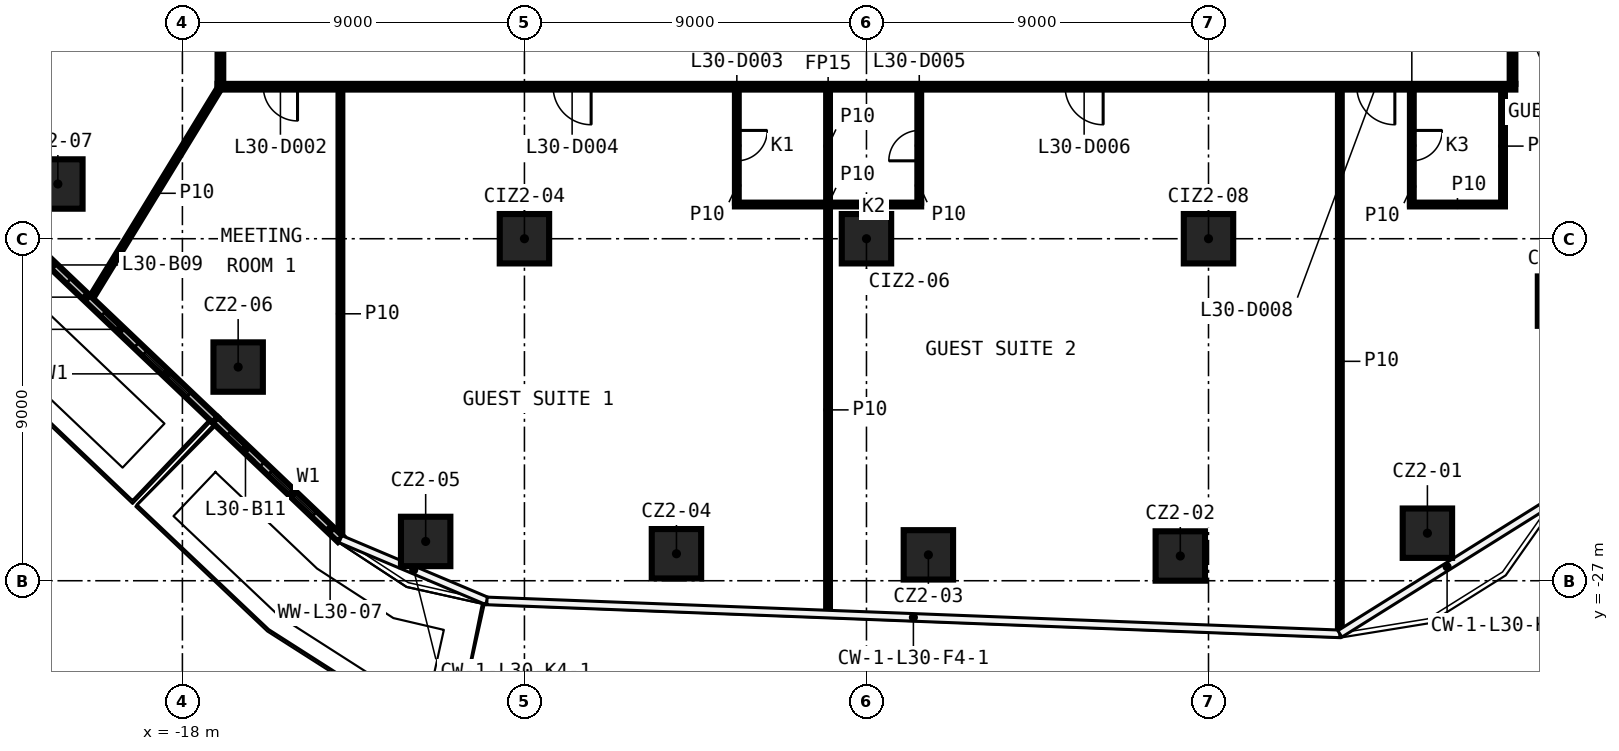
"""IFC4 building model, lengths in metres.
Left out: names, types, materials, properties, quantities, classifications, styles, units other than length and angle.
Written with IfcOpenShell. Run it as: python <this file> out.ifc"""

import sys

from ifc_helpers import new_model, si_unit, direction, frame, frame_2d, origin, origin_2d, place, context, subcontext, project, spatial, rectangle, extrude, element, fill, save


model = new_model("IFC4")
c1 = context("Model", 3, precision=1e-05, world=origin(), true_north=direction((0.0, 1.0)))
c2 = subcontext(c1, "Body", "Model", "MODEL_VIEW")
j1 = project(units=[si_unit("LENGTHUNIT", "METRE"), si_unit("PLANEANGLEUNIT", "RADIAN")], contexts=[c1])
p1 = place(None, origin())
s1 = spatial("IfcSite", under=j1, at=p1, CompositionType="ELEMENT")
p2 = place(p1, origin())
s2 = spatial("IfcBuilding", under=s1, at=p2, CompositionType="ELEMENT")
p3 = place(p2, frame((0.0, 0.0, 135.9)))
s3 = spatial("IfcBuildingStorey", under=s2, at=p3, CompositionType="ELEMENT", Elevation=135.9)
for number, where, z_axis, x_axis in (
    (1, (14.76, -25.749, 0.0), (0.0, 0.0, 1.0), (1.0, 0.0, 0.0)),
    (2, (8.258, -26.349, 0.0), (0.0, 0.0, 1.0), (1.0, 0.0, 0.0)),
    (3, (1.629, -26.319, 0.0), (0.0, 0.0, 1.0), (1.0, 0.0, 0.0)),
    (4, (-5.0, -26.29, 0.0), (0.0, 0.0, 1.0), (1.0, 0.0, 0.0)),
    (5, (-11.599, -25.966, 0.0), (0.0, 0.0, 1.0), (1.0, 0.0, 0.0)),
    (6, (-16.533, -21.377, 0.0), (0.0, 0.0, 1.0), (1.0, 0.0, 0.0)),
    (7, (-21.277, -16.56, 0.0), (0.0, 0.0, 1.0), (1.0, 0.0, 0.0)),
    (8, (18.315, -19.642, 0.0), (0.0, 0.0, 1.0), (1.0, 0.0, 0.0)),
    (9, (-9.0, -18.0, 0.0), (0.0, 0.0, 1.0), (1.0, 0.0, 0.0)),
    (10, (0.0, -18.0, 0.0), (0.0, 0.0, 1.0), (1.0, 0.0, 0.0)),
    (11, (9.0, -18.0, 0.0), (0.0, 0.0, 1.0), (1.0, 0.0, 0.0)),
):
    element("IfcColumn", number, at=place(p3, frame(where, z_axis=z_axis, x_axis=x_axis)), inside=s3, PredefinedType="COLUMN", context=c2, shape_type="SweptSolid", body=[
        extrude(rectangle(XDim=1.3, YDim=1.3, at=origin_2d()), origin(), (0.0, 0.0, 1.0), 3.3),
    ])
p4 = place(p3, frame((-3.461, -17.1, 0.0), z_axis=(0.0, 0.0, 1.0), x_axis=(1.0, 0.0, 0.0)))
e12 = element("IfcWall", 12, at=p4, inside=s3, PredefinedType="PARTITIONING", context=c2, shape_type="SweptSolid", body=[
    extrude(rectangle(XDim=4.9, YDim=0.1, at=frame_2d((2.45, 0.0))), origin(), (0.0, 0.0, 1.0), 3.3),
])
p5 = place(p3, frame((14.3, -17.1, 0.0), z_axis=(0.0, 0.0, 1.0), x_axis=(1.0, 0.0, 0.0)))
e13 = element("IfcWall", 13, at=p5, inside=s3, PredefinedType="PARTITIONING", context=c2, shape_type="SweptSolid", body=[
    extrude(rectangle(XDim=2.5, YDim=0.1, at=frame_2d((1.25, 0.0))), origin(), (0.0, 0.0, 1.0), 3.3),
])
p6 = place(p3, frame((17.075, -14.0, 0.0), z_axis=(0.0, 0.0, 1.0), x_axis=(-1.0, 0.0, 0.0)))
e14 = element("IfcWall", 14, at=p6, inside=s3, PredefinedType="PARTITIONING", context=c2, shape_type="SweptSolid", body=[
    extrude(rectangle(XDim=34.15, YDim=0.15, at=frame_2d((17.075, 0.0))), origin(), (0.0, 0.0, 1.0), 3.3),
])
p7 = place(p6, frame((32.046, 0.0, 0.0)))
e15 = element("IfcOpeningElement", 15, at=p7, cuts=e14, PredefinedType="OPENING", context=c2, shape_type="SweptSolid", body=[
    extrude(rectangle(XDim=0.9, YDim=2.1, at=frame_2d((0.45, 1.05))), frame((0.0, 0.085, 0.0), z_axis=(0.0, -1.0, 0.0), x_axis=(1.0, 0.0, 0.0)), (0.0, 0.0, 1.0), 0.17),
])
p8 = place(p6, frame((24.32, 0.0, 0.0)))
e16 = element("IfcOpeningElement", 16, at=p8, cuts=e14, PredefinedType="OPENING", context=c2, shape_type="SweptSolid", body=[
    extrude(rectangle(XDim=1.0, YDim=2.1, at=frame_2d((0.5, 1.05))), frame((0.0, 0.085, 0.0), z_axis=(0.0, -1.0, 0.0), x_axis=(1.0, 0.0, 0.0)), (0.0, 0.0, 1.0), 0.17),
])
p9 = place(p6, frame((10.847, 0.0, 0.0)))
e17 = element("IfcOpeningElement", 17, at=p9, cuts=e14, PredefinedType="OPENING", context=c2, shape_type="SweptSolid", body=[
    extrude(rectangle(XDim=1.0, YDim=2.1, at=frame_2d((0.5, 1.05))), frame((0.0, 0.085, 0.0), z_axis=(0.0, -1.0, 0.0), x_axis=(1.0, 0.0, 0.0)), (0.0, 0.0, 1.0), 0.17),
])
p10 = place(p6, frame((3.172, 0.0, 0.0)))
e18 = element("IfcOpeningElement", 18, at=p10, cuts=e14, PredefinedType="OPENING", context=c2, shape_type="SweptSolid", body=[
    extrude(rectangle(XDim=1.0, YDim=2.1, at=frame_2d((0.5, 1.05))), frame((0.0, 0.085, 0.0), z_axis=(0.0, -1.0, 0.0), x_axis=(1.0, 0.0, 0.0)), (0.0, 0.0, 1.0), 0.17),
])
p11 = place(p3, frame((-20.429, -19.608, 0.0), z_axis=(0.0, 0.0, 1.0), x_axis=(0.521610739124, 0.853183589171, 0.0)))
e19 = element("IfcWall", 19, at=p11, inside=s3, PredefinedType="PARTITIONING", context=c2, shape_type="SweptSolid", body=[
    extrude(rectangle(XDim=6.574, YDim=0.1, at=frame_2d((3.287, 0.0))), origin(), (0.0, 0.0, 1.0), 3.3),
])
p12 = place(p3, frame((17.0, 13.925, 0.0), z_axis=(0.0, 0.0, 1.0), x_axis=(0.0, -1.0, 0.0)))
e20 = element("IfcWall", 20, at=p12, inside=s3, PredefinedType="PARTITIONING", context=c2, shape_type="SweptSolid", body=[
    extrude(rectangle(XDim=27.85, YDim=0.15, at=frame_2d((13.925, 0.0))), origin(), (0.0, 0.0, 1.0), 3.3),
])
p13 = place(p12, frame((24.983, 0.0, 0.0)))
e21 = element("IfcOpeningElement", 21, at=p13, cuts=e20, PredefinedType="OPENING", context=c2, shape_type="SweptSolid", body=[
    extrude(rectangle(XDim=0.9, YDim=2.1, at=frame_2d((0.45, 1.05))), frame((0.0, 0.085, 0.0), z_axis=(0.0, -1.0, 0.0), x_axis=(1.0, 0.0, 0.0)), (0.0, 0.0, 1.0), 0.17),
])
p14 = place(p12, frame((20.143, 0.0, 0.0)))
e22 = element("IfcOpeningElement", 22, at=p14, cuts=e20, PredefinedType="OPENING", context=c2, shape_type="SweptSolid", body=[
    extrude(rectangle(XDim=0.9, YDim=2.1, at=frame_2d((0.45, 1.05))), frame((0.0, 0.085, 0.0), z_axis=(0.0, -1.0, 0.0), x_axis=(1.0, 0.0, 0.0)), (0.0, 0.0, 1.0), 0.17),
])
p15 = place(p12, frame((11.054, 0.0, 0.0)))
e23 = element("IfcOpeningElement", 23, at=p15, cuts=e20, PredefinedType="OPENING", context=c2, shape_type="SweptSolid", body=[
    extrude(rectangle(XDim=1.0, YDim=2.1, at=frame_2d((0.5, 1.05))), frame((0.0, 0.085, 0.0), z_axis=(0.0, -1.0, 0.0), x_axis=(1.0, 0.0, 0.0)), (0.0, 0.0, 1.0), 0.17),
])
p16 = place(p12, frame((7.139, 0.0, 0.0)))
e24 = element("IfcOpeningElement", 24, at=p16, cuts=e20, PredefinedType="OPENING", context=c2, shape_type="SweptSolid", body=[
    extrude(rectangle(XDim=0.9, YDim=2.1, at=frame_2d((0.45, 1.05))), frame((0.0, 0.085, 0.0), z_axis=(0.0, -1.0, 0.0), x_axis=(1.0, 0.0, 0.0)), (0.0, 0.0, 1.0), 0.17),
])
p17 = place(p3, frame((16.75, -17.05, 0.0), z_axis=(0.0, 0.0, 1.0), x_axis=(0.0, 1.0, 0.0)))
e25 = element("IfcWall", 25, at=p17, inside=s3, PredefinedType="PARTITIONING", context=c2, shape_type="SweptSolid", body=[
    extrude(rectangle(XDim=2.975, YDim=0.1, at=frame_2d((1.488, 0.0))), origin(), (0.0, 0.0, 1.0), 3.3),
])
p18 = place(p3, frame((14.35, -14.075, 0.0), z_axis=(0.0, 0.0, 1.0), x_axis=(0.0, -1.0, 0.0)))
e26 = element("IfcWall", 26, at=p18, inside=s3, PredefinedType="PARTITIONING", context=c2, shape_type="SweptSolid", body=[
    extrude(rectangle(XDim=3.025, YDim=0.1, at=frame_2d((1.513, 0.0))), origin(), (0.0, 0.0, 1.0), 3.3),
])
p19 = place(p18, frame((1.075, 0.0, 0.0)))
e27 = element("IfcOpeningElement", 27, at=p19, cuts=e26, PredefinedType="OPENING", context=c2, shape_type="SweptSolid", body=[
    extrude(rectangle(XDim=0.8, YDim=2.1, at=frame_2d((0.4, 1.05))), frame((0.0, 0.06, 0.0), z_axis=(0.0, -1.0, 0.0), x_axis=(1.0, 0.0, 0.0)), (0.0, 0.0, 1.0), 0.12),
])
p20 = place(p3, frame((12.456, -28.378, 0.0), z_axis=(0.0, 0.0, 1.0), x_axis=(0.0, 1.0, 0.0)))
e28 = element("IfcWall", 28, at=p20, inside=s3, PredefinedType="PARTITIONING", context=c2, shape_type="SweptSolid", body=[
    extrude(rectangle(XDim=14.303, YDim=0.1, at=frame_2d((7.151, 0.0))), origin(), (0.0, 0.0, 1.0), 3.3),
])
p21 = place(p3, frame((1.389, -17.05, 0.0), z_axis=(0.0, 0.0, 1.0), x_axis=(0.0, 1.0, 0.0)))
e29 = element("IfcWall", 29, at=p21, inside=s3, PredefinedType="PARTITIONING", context=c2, shape_type="SweptSolid", body=[
    extrude(rectangle(XDim=2.975, YDim=0.1, at=frame_2d((1.488, 0.0))), origin(), (0.0, 0.0, 1.0), 3.3),
])
p22 = place(p21, frame((1.1, 0.0, 0.0)))
e30 = element("IfcOpeningElement", 30, at=p22, cuts=e29, PredefinedType="OPENING", context=c2, shape_type="SweptSolid", body=[
    extrude(rectangle(XDim=0.8, YDim=2.1, at=frame_2d((0.4, 1.05))), frame((0.0, 0.06, 0.0), z_axis=(0.0, -1.0, 0.0), x_axis=(1.0, 0.0, 0.0)), (0.0, 0.0, 1.0), 0.12),
])
p23 = place(p3, frame((-1.011, -27.858, 0.0), z_axis=(0.0, 0.0, 1.0), x_axis=(0.0, 1.0, 0.0)))
e31 = element("IfcWall", 31, at=p23, inside=s3, PredefinedType="PARTITIONING", context=c2, shape_type="SweptSolid", body=[
    extrude(rectangle(XDim=10.708, YDim=0.1, at=frame_2d((5.354, 0.0))), origin(), (0.0, 0.0, 1.0), 3.3),
])
p24 = place(p3, frame((-1.011, -17.05, 0.0), z_axis=(0.0, 0.0, 1.0), x_axis=(0.0, 1.0, 0.0)))
e32 = element("IfcWall", 32, at=p24, inside=s3, PredefinedType="PARTITIONING", context=c2, shape_type="SweptSolid", body=[
    extrude(rectangle(XDim=2.975, YDim=0.1, at=frame_2d((1.488, 0.0))), origin(), (0.0, 0.0, 1.0), 3.3),
])
p25 = place(p3, frame((-3.411, -14.075, 0.0), z_axis=(0.0, 0.0, 1.0), x_axis=(0.0, -1.0, 0.0)))
e33 = element("IfcWall", 33, at=p25, inside=s3, PredefinedType="PARTITIONING", context=c2, shape_type="SweptSolid", body=[
    extrude(rectangle(XDim=2.975, YDim=0.1, at=frame_2d((1.488, 0.0))), origin(), (0.0, 0.0, 1.0), 3.3),
])
p26 = place(p25, frame((1.075, 0.0, 0.0)))
e34 = element("IfcOpeningElement", 34, at=p26, cuts=e33, PredefinedType="OPENING", context=c2, shape_type="SweptSolid", body=[
    extrude(rectangle(XDim=0.8, YDim=2.1, at=frame_2d((0.4, 1.05))), frame((0.0, 0.06, 0.0), z_axis=(0.0, -1.0, 0.0), x_axis=(1.0, 0.0, 0.0)), (0.0, 0.0, 1.0), 0.12),
])
p27 = place(p3, frame((-13.842, -25.876, 0.0), z_axis=(0.0, 0.0, 1.0), x_axis=(0.0, 1.0, 0.0)))
e35 = element("IfcWall", 35, at=p27, inside=s3, PredefinedType="PARTITIONING", context=c2, shape_type="SweptSolid", body=[
    extrude(rectangle(XDim=11.801, YDim=0.1, at=frame_2d((5.9, 0.0))), origin(), (0.0, 0.0, 1.0), 3.3),
])
p28 = place(p3, frame((-17.0, -13.925, 0.0), z_axis=(0.0, 0.0, 1.0), x_axis=(0.0, 1.0, 0.0)))
e36 = element("IfcWall", 36, at=p28, inside=s3, PredefinedType="PARTITIONING", context=c2, shape_type="SweptSolid", body=[
    extrude(rectangle(XDim=27.85, YDim=0.15, at=frame_2d((13.925, 0.0))), origin(), (0.0, 0.0, 1.0), 3.3),
])
p29 = place(p28, frame((11.107, 0.0, 0.0)))
e37 = element("IfcOpeningElement", 37, at=p29, cuts=e36, PredefinedType="OPENING", context=c2, shape_type="SweptSolid", body=[
    extrude(rectangle(XDim=0.9, YDim=2.1, at=frame_2d((0.45, 1.05))), frame((0.0, 0.085, 0.0), z_axis=(0.0, -1.0, 0.0), x_axis=(1.0, 0.0, 0.0)), (0.0, 0.0, 1.0), 0.17),
])
p30 = place(p28, frame((25.204, 0.0, 0.0)))
e38 = element("IfcOpeningElement", 38, at=p30, cuts=e36, PredefinedType="OPENING", context=c2, shape_type="SweptSolid", body=[
    extrude(rectangle(XDim=0.9, YDim=2.1, at=frame_2d((0.45, 1.05))), frame((0.0, 0.085, 0.0), z_axis=(0.0, -1.0, 0.0), x_axis=(1.0, 0.0, 0.0)), (0.0, 0.0, 1.0), 0.17),
])
p31 = place(p28, frame((18.833, 0.0, 0.0)))
e39 = element("IfcOpeningElement", 39, at=p31, cuts=e36, PredefinedType="OPENING", context=c2, shape_type="SweptSolid", body=[
    extrude(rectangle(XDim=1.0, YDim=2.1, at=frame_2d((0.5, 1.05))), frame((0.0, 0.085, 0.0), z_axis=(0.0, -1.0, 0.0), x_axis=(1.0, 0.0, 0.0)), (0.0, 0.0, 1.0), 0.17),
])
p32 = place(p28, frame((17.31, 0.0, 0.0)))
e40 = element("IfcOpeningElement", 40, at=p32, cuts=e36, PredefinedType="OPENING", context=c2, shape_type="SweptSolid", body=[
    extrude(rectangle(XDim=1.0, YDim=2.1, at=frame_2d((0.5, 1.05))), frame((0.0, 0.085, 0.0), z_axis=(0.0, -1.0, 0.0), x_axis=(1.0, 0.0, 0.0)), (0.0, 0.0, 1.0), 0.17),
])
p33 = place(p3, frame((-23.741, -16.484, 0.0), z_axis=(0.0, 0.0, 1.0), x_axis=(0.724483683082, -0.689291950445, 0.0)))
e41 = element("IfcWall", 41, at=p33, inside=s3, PredefinedType="SOLIDWALL", context=c2, shape_type="SweptSolid", body=[
    extrude(rectangle(XDim=9.116, YDim=0.2, at=frame_2d((4.558, 0.0))), origin(), (0.0, 0.0, 1.0), 3.3),
])
p34 = place(p33, frame((0.5, 0.0, 0.6)))
e42 = element("IfcOpeningElement", 42, at=p34, cuts=e41, PredefinedType="OPENING", context=c2, shape_type="SweptSolid", body=[
    extrude(rectangle(XDim=1.6, YDim=2.4, at=frame_2d((0.8, 1.2))), frame((0.0, 0.11, 0.0), z_axis=(0.0, -1.0, 0.0), x_axis=(1.0, 0.0, 0.0)), (0.0, 0.0, 1.0), 0.22),
])
p35 = place(p33, frame((2.6, 0.0, 0.0)))
e43 = element("IfcOpeningElement", 43, at=p35, cuts=e41, PredefinedType="OPENING", context=c2, shape_type="SweptSolid", body=[
    extrude(rectangle(XDim=1.2, YDim=2.4, at=frame_2d((0.6, 1.2))), frame((0.0, 0.11, 0.0), z_axis=(0.0, -1.0, 0.0), x_axis=(1.0, 0.0, 0.0)), (0.0, 0.0, 1.0), 0.22),
])
p36 = place(p33, frame((6.558, 0.0, 0.6)))
e44 = element("IfcOpeningElement", 44, at=p36, cuts=e41, PredefinedType="OPENING", context=c2, shape_type="SweptSolid", body=[
    extrude(rectangle(XDim=1.6, YDim=2.4, at=frame_2d((0.8, 1.2))), frame((0.0, 0.11, 0.0), z_axis=(0.0, -1.0, 0.0), x_axis=(1.0, 0.0, 0.0)), (0.0, 0.0, 1.0), 0.22),
])
p37 = place(p33, frame((5.058, 0.0, 0.0)))
e45 = element("IfcOpeningElement", 45, at=p37, cuts=e41, PredefinedType="OPENING", context=c2, shape_type="SweptSolid", body=[
    extrude(rectangle(XDim=1.2, YDim=2.4, at=frame_2d((0.6, 1.2))), frame((0.0, 0.11, 0.0), z_axis=(0.0, -1.0, 0.0), x_axis=(1.0, 0.0, 0.0)), (0.0, 0.0, 1.0), 0.22),
])
p38 = place(p3, frame((-17.137, -22.768, 0.0), z_axis=(0.0, 0.0, 1.0), x_axis=(0.724465880686, -0.689310661257, 0.0)))
e46 = element("IfcWall", 46, at=p38, inside=s3, PredefinedType="SOLIDWALL", context=c2, shape_type="SweptSolid", body=[
    extrude(rectangle(XDim=4.549, YDim=0.2, at=frame_2d((2.274, 0.0))), origin(), (0.0, 0.0, 1.0), 3.3),
])
p39 = place(p38, frame((2.0, 0.0, 0.6)))
e47 = element("IfcOpeningElement", 47, at=p39, cuts=e46, PredefinedType="OPENING", context=c2, shape_type="SweptSolid", body=[
    extrude(rectangle(XDim=1.6, YDim=2.4, at=frame_2d((0.8, 1.2))), frame((0.0, 0.11, 0.0), z_axis=(0.0, -1.0, 0.0), x_axis=(1.0, 0.0, 0.0)), (0.0, 0.0, 1.0), 0.22),
])
p40 = place(p38, frame((0.5, 0.0, 0.0)))
e48 = element("IfcOpeningElement", 48, at=p40, cuts=e46, PredefinedType="OPENING", context=c2, shape_type="SweptSolid", body=[
    extrude(rectangle(XDim=1.2, YDim=2.4, at=frame_2d((0.6, 1.2))), frame((0.0, 0.11, 0.0), z_axis=(0.0, -1.0, 0.0), x_axis=(1.0, 0.0, 0.0)), (0.0, 0.0, 1.0), 0.22),
])
p41 = place(p7, origin())
e49 = element("IfcDoor", 49, at=p41, inside=s3, OperationType="SINGLE_SWING_RIGHT", PredefinedType="DOOR", context=c2, shape_type="SweptSolid", body=[
    extrude(rectangle(XDim=0.9, YDim=2.1, at=frame_2d((0.45, 1.05))), frame((0.0, 0.025, 0.0), z_axis=(0.0, -1.0, 0.0), x_axis=(1.0, 0.0, 0.0)), (0.0, 0.0, 1.0), 0.05),
])
fill(e15, e49)
p42 = place(p26, origin())
e50 = element("IfcDoor", 50, at=p42, inside=s3, OperationType="SINGLE_SWING_RIGHT", PredefinedType="DOOR", context=c2, shape_type="SweptSolid", body=[
    extrude(rectangle(XDim=0.8, YDim=2.1, at=frame_2d((0.4, 1.05))), frame((0.0, 0.025, 0.0), z_axis=(0.0, -1.0, 0.0), x_axis=(1.0, 0.0, 0.0)), (0.0, 0.0, 1.0), 0.05),
])
fill(e34, e50)
p43 = place(p8, origin())
e51 = element("IfcDoor", 51, at=p43, inside=s3, OperationType="SINGLE_SWING_LEFT", PredefinedType="DOOR", context=c2, shape_type="SweptSolid", body=[
    extrude(rectangle(XDim=1.0, YDim=2.1, at=frame_2d((0.5, 1.05))), frame((0.0, 0.025, 0.0), z_axis=(0.0, -1.0, 0.0), x_axis=(1.0, 0.0, 0.0)), (0.0, 0.0, 1.0), 0.05),
])
fill(e16, e51)
p44 = place(p22, origin())
e52 = element("IfcDoor", 52, at=p44, inside=s3, OperationType="SINGLE_SWING_LEFT", PredefinedType="DOOR", context=c2, shape_type="SweptSolid", body=[
    extrude(rectangle(XDim=0.8, YDim=2.1, at=frame_2d((0.4, 1.05))), frame((0.0, 0.025, 0.0), z_axis=(0.0, -1.0, 0.0), x_axis=(1.0, 0.0, 0.0)), (0.0, 0.0, 1.0), 0.05),
])
fill(e30, e52)
p45 = place(p9, origin())
e53 = element("IfcDoor", 53, at=p45, inside=s3, OperationType="SINGLE_SWING_RIGHT", PredefinedType="DOOR", context=c2, shape_type="SweptSolid", body=[
    extrude(rectangle(XDim=1.0, YDim=2.1, at=frame_2d((0.5, 1.05))), frame((0.0, 0.025, 0.0), z_axis=(0.0, -1.0, 0.0), x_axis=(1.0, 0.0, 0.0)), (0.0, 0.0, 1.0), 0.05),
])
fill(e17, e53)
p46 = place(p19, origin())
e54 = element("IfcDoor", 54, at=p46, inside=s3, OperationType="SINGLE_SWING_RIGHT", PredefinedType="DOOR", context=c2, shape_type="SweptSolid", body=[
    extrude(rectangle(XDim=0.8, YDim=2.1, at=frame_2d((0.4, 1.05))), frame((0.0, 0.025, 0.0), z_axis=(0.0, -1.0, 0.0), x_axis=(1.0, 0.0, 0.0)), (0.0, 0.0, 1.0), 0.05),
])
fill(e27, e54)
p47 = place(p10, origin())
e55 = element("IfcDoor", 55, at=p47, inside=s3, OperationType="SINGLE_SWING_LEFT", PredefinedType="DOOR", context=c2, shape_type="SweptSolid", body=[
    extrude(rectangle(XDim=1.0, YDim=2.1, at=frame_2d((0.5, 1.05))), frame((0.0, 0.025, 0.0), z_axis=(0.0, -1.0, 0.0), x_axis=(1.0, 0.0, 0.0)), (0.0, 0.0, 1.0), 0.05),
])
fill(e18, e55)
p48 = place(p35, origin())
e56 = element("IfcDoor", 56, at=p48, inside=s3, OperationType="SLIDING_TO_LEFT", PredefinedType="DOOR", context=c2, shape_type="SweptSolid", body=[
    extrude(rectangle(XDim=1.2, YDim=2.4, at=frame_2d((0.6, 1.2))), frame((0.0, 0.025, 0.0), z_axis=(0.0, -1.0, 0.0), x_axis=(1.0, 0.0, 0.0)), (0.0, 0.0, 1.0), 0.05),
])
fill(e43, e56)
p49 = place(p36, origin())
e57 = element("IfcWindow", 57, at=p49, inside=s3, PartitioningType="SINGLE_PANEL", PredefinedType="WINDOW", context=c2, shape_type="SweptSolid", body=[
    extrude(rectangle(XDim=1.6, YDim=2.4, at=frame_2d((0.8, 1.2))), frame((0.0, 0.03, 0.0), z_axis=(0.0, -1.0, 0.0), x_axis=(1.0, 0.0, 0.0)), (0.0, 0.0, 1.0), 0.06),
])
fill(e44, e57)
p50 = place(p37, origin())
e58 = element("IfcDoor", 58, at=p50, inside=s3, OperationType="SLIDING_TO_LEFT", PredefinedType="DOOR", context=c2, shape_type="SweptSolid", body=[
    extrude(rectangle(XDim=1.2, YDim=2.4, at=frame_2d((0.6, 1.2))), frame((0.0, 0.025, 0.0), z_axis=(0.0, -1.0, 0.0), x_axis=(1.0, 0.0, 0.0)), (0.0, 0.0, 1.0), 0.05),
])
fill(e45, e58)
p51 = place(p39, origin())
e59 = element("IfcWindow", 59, at=p51, inside=s3, PartitioningType="SINGLE_PANEL", PredefinedType="WINDOW", context=c2, shape_type="SweptSolid", body=[
    extrude(rectangle(XDim=1.6, YDim=2.4, at=frame_2d((0.8, 1.2))), frame((0.0, 0.03, 0.0), z_axis=(0.0, -1.0, 0.0), x_axis=(1.0, 0.0, 0.0)), (0.0, 0.0, 1.0), 0.06),
])
fill(e47, e59)
p52 = place(p40, origin())
e60 = element("IfcDoor", 60, at=p52, inside=s3, OperationType="SLIDING_TO_LEFT", PredefinedType="DOOR", context=c2, shape_type="SweptSolid", body=[
    extrude(rectangle(XDim=1.2, YDim=2.4, at=frame_2d((0.6, 1.2))), frame((0.0, 0.025, 0.0), z_axis=(0.0, -1.0, 0.0), x_axis=(1.0, 0.0, 0.0)), (0.0, 0.0, 1.0), 0.05),
])
fill(e48, e60)
save(model, sys.argv[1])
